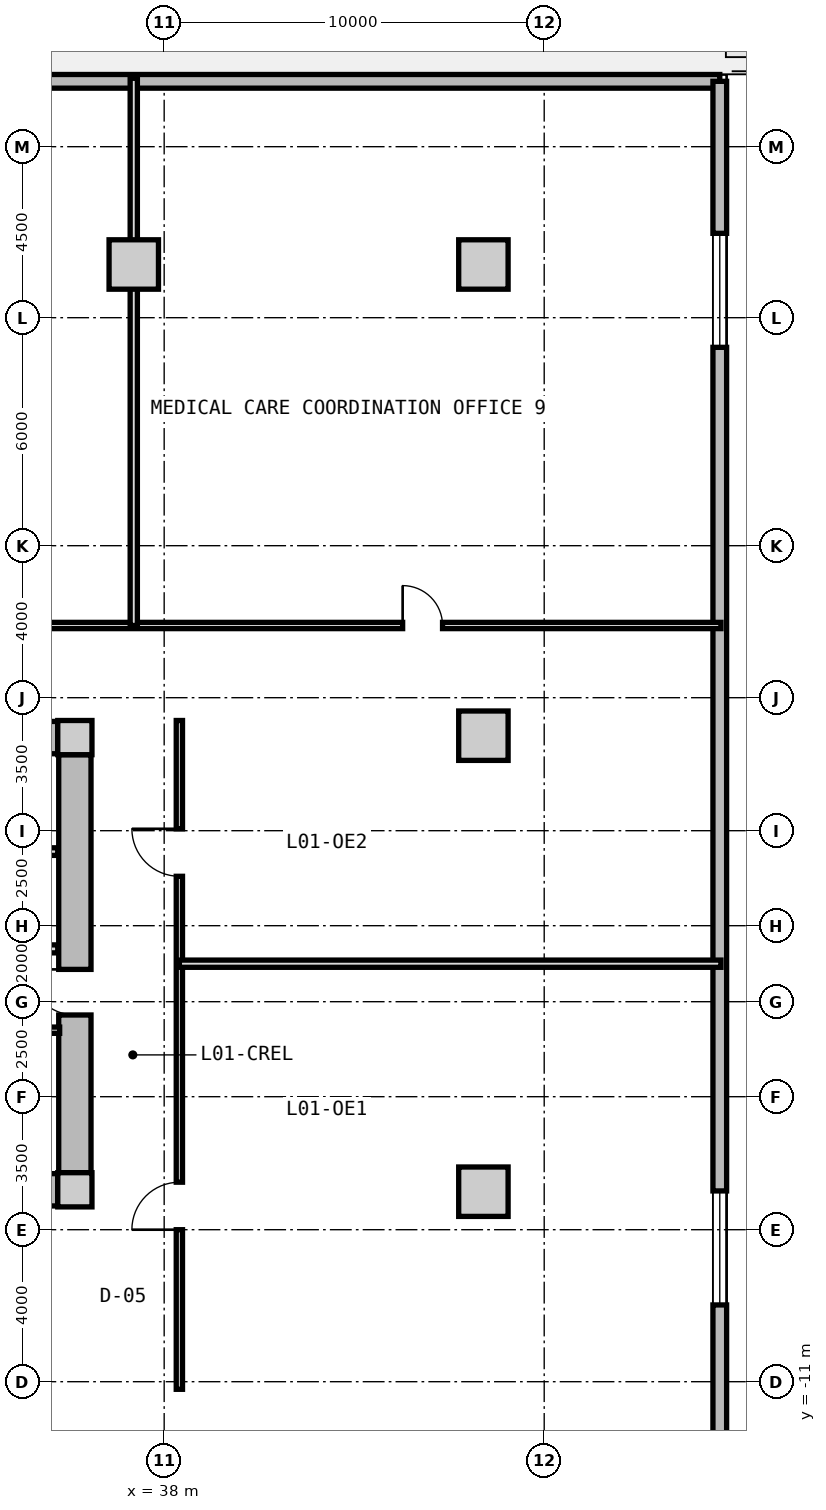
"""IFC4 building model, lengths in metres.
Left out: names, types, materials, properties, quantities, classifications, styles, units other than length and angle.
Written with IfcOpenShell. Run it as: python <this file> out.ifc"""

import sys

from ifc_helpers import new_model, si_unit, direction, frame, frame_2d, origin, origin_2d, place, context, subcontext, project, spatial, rectangle, extrude, source, transform, mapped, element, fill, save


model = new_model("IFC4")
c1 = context("Model", 3, precision=1e-05, world=origin(), true_north=direction((0.0, 1.0)))
c2 = subcontext(c1, "Body", "Model", "MODEL_VIEW")
j1 = project(units=[si_unit("LENGTHUNIT", "METRE"), si_unit("PLANEANGLEUNIT", "RADIAN")], contexts=[c1])
p1 = place(None, origin())
s1 = spatial("IfcSite", under=j1, at=p1, CompositionType="ELEMENT")
p2 = place(p1, origin())
s2 = spatial("IfcBuilding", under=s1, at=p2, CompositionType="ELEMENT")
p3 = place(p2, frame((0.0, 0.0, 4.2)))
s3 = spatial("IfcBuildingStorey", under=s2, at=p3, CompositionType="ELEMENT", Elevation=4.2)
m1 = source(origin(), c2, "Body", "SweptSolid", [
    extrude(rectangle(XDim=0.9, YDim=0.9, at=origin_2d()), origin(), (0.0, 0.0, 1.0), 4.2),
])
for number, where, z_axis, x_axis in (
    (1, (35.65, -5.95, 0.0), (0.0, 0.0, 1.0), (1.0, 0.0, 0.0)),
    (2, (35.65, 5.95, 0.0), (0.0, 0.0, 1.0), (1.0, 0.0, 0.0)),
):
    element("IfcColumn", number, at=place(p3, frame(where, z_axis=z_axis, x_axis=x_axis)), inside=s3, PredefinedType="COLUMN", context=c2, shape_type="MappedRepresentation", body=[
        mapped(m1, transform((0.0, 0.0, 0.0), x_axis=(1.0, 0.0, 0.0), y_axis=(0.0, 1.0, 0.0), z_axis=(0.0, 0.0, 1.0), scale=1.0)),
    ])
m2 = source(origin(), c2, "Body", "SweptSolid", [
    extrude(rectangle(XDim=14.4, YDim=0.85, at=frame_2d((7.2, 0.0))), origin(), (0.0, 0.0, 1.0), 3.88),
])
for number, where, z_axis, x_axis in (
    (3, (20.8, 5.95, 0.0), (0.0, 0.0, 1.0), (1.0, 0.0, 0.0)),
    (4, (35.2, -5.95, 0.0), (0.0, 0.0, 1.0), (-1.0, 0.0, 0.0)),
):
    element("IfcWall", number, at=place(p3, frame(where, z_axis=z_axis, x_axis=x_axis)), inside=s3, PredefinedType="SHEAR", context=c2, shape_type="MappedRepresentation", body=[
        mapped(m2, transform((0.0, 0.0, 0.0), x_axis=(1.0, 0.0, 0.0), y_axis=(0.0, 1.0, 0.0), z_axis=(0.0, 0.0, 1.0), scale=1.0)),
    ])
m3 = source(origin(), c2, "Body", "SweptSolid", [
    extrude(rectangle(XDim=11.0, YDim=0.85, at=frame_2d((5.5, 0.0))), origin(), (0.0, 0.0, 1.0), 3.88),
])
p4 = place(p3, frame((35.65, 5.5, 0.0), z_axis=(0.0, 0.0, 1.0), x_axis=(0.0, -1.0, 0.0)))
e5 = element("IfcWall", 5, at=p4, inside=s3, PredefinedType="SHEAR", context=c2, shape_type="MappedRepresentation", body=[
    mapped(m3, transform((0.0, 0.0, 0.0), x_axis=(1.0, 0.0, 0.0), y_axis=(0.0, 1.0, 0.0), z_axis=(0.0, 0.0, 1.0), scale=1.0)),
])
p5 = place(p4, frame((5.65, 0.0, 0.0)))
e6 = element("IfcOpeningElement", 6, at=p5, cuts=e5, PredefinedType="OPENING", context=c2, shape_type="SweptSolid", body=[
    extrude(rectangle(XDim=1.2, YDim=2.15, at=frame_2d((0.6, 1.075))), frame((0.0, 0.435, 0.0), z_axis=(0.0, -1.0, 0.0), x_axis=(1.0, 0.0, 0.0)), (0.0, 0.0, 1.0), 0.87),
])
m4 = source(origin(), c2, "Body", "SweptSolid", [
    extrude(rectangle(XDim=1.3, YDim=1.3, at=origin_2d()), origin(), (0.0, 0.0, 1.0), 4.2),
])
for number, where, z_axis, x_axis in (
    (7, (37.2, 18.4, 0.0), (0.0, 0.0, 1.0), (1.0, 0.0, 0.0)),
    (8, (46.4, 18.4, 0.0), (0.0, 0.0, 1.0), (1.0, 0.0, 0.0)),
    (9, (46.4, -6.0, 0.0), (0.0, 0.0, 1.0), (1.0, 0.0, 0.0)),
    (10, (46.4, 6.0, 0.0), (0.0, 0.0, 1.0), (1.0, 0.0, 0.0)),
):
    element("IfcColumn", number, at=place(p3, frame(where, z_axis=z_axis, x_axis=x_axis)), inside=s3, PredefinedType="COLUMN", context=c2, shape_type="MappedRepresentation", body=[
        mapped(m4, transform((0.0, 0.0, 0.0), x_axis=(1.0, 0.0, 0.0), y_axis=(0.0, 1.0, 0.0), z_axis=(0.0, 0.0, 1.0), scale=1.0)),
    ])
m5 = source(origin(), c2, "Body", "SweptSolid", [
    extrude(rectangle(XDim=105.24, YDim=0.36, at=frame_2d((52.62, 0.0))), origin(), (0.0, 0.0, 1.0), 3.88),
])
p6 = place(p3, frame((-52.62, 23.22, 0.0), z_axis=(0.0, 0.0, 1.0), x_axis=(1.0, 0.0, 0.0)))
e11 = element("IfcWall", 11, at=p6, inside=s3, PredefinedType="SOLIDWALL", context=c2, shape_type="MappedRepresentation", body=[
    mapped(m5, transform((0.0, 0.0, 0.0), x_axis=(1.0, 0.0, 0.0), y_axis=(0.0, 1.0, 0.0), z_axis=(0.0, 0.0, 1.0), scale=1.0)),
])
p7 = place(p6, frame((49.12, 0.0, 0.0)))
e12 = element("IfcOpeningElement", 12, at=p7, cuts=e11, PredefinedType="OPENING", context=c2, shape_type="SweptSolid", body=[
    extrude(rectangle(XDim=1.15, YDim=2.25, at=frame_2d((0.575, 1.125))), frame((0.0, 0.19, 0.0), z_axis=(0.0, -1.0, 0.0), x_axis=(1.0, 0.0, 0.0)), (0.0, 0.0, 1.0), 0.38),
])
p8 = place(p6, frame((4.0, 0.0, 0.85)))
e13 = element("IfcOpeningElement", 13, at=p8, cuts=e11, PredefinedType="OPENING", context=c2, shape_type="SweptSolid", body=[
    extrude(rectangle(XDim=3.0, YDim=2.1, at=frame_2d((1.5, 1.05))), frame((0.0, 0.19, 0.0), z_axis=(0.0, -1.0, 0.0), x_axis=(1.0, 0.0, 0.0)), (0.0, 0.0, 1.0), 0.38),
])
p9 = place(p6, frame((12.4, 0.0, 0.9)))
e14 = element("IfcOpeningElement", 14, at=p9, cuts=e11, PredefinedType="OPENING", context=c2, shape_type="SweptSolid", body=[
    extrude(rectangle(XDim=1.8, YDim=2.0, at=frame_2d((0.9, 1.0))), frame((0.0, 0.19, 0.0), z_axis=(0.0, -1.0, 0.0), x_axis=(1.0, 0.0, 0.0)), (0.0, 0.0, 1.0), 0.38),
])
p10 = place(p6, frame((20.8, 0.0, 0.85)))
e15 = element("IfcOpeningElement", 15, at=p10, cuts=e11, PredefinedType="OPENING", context=c2, shape_type="SweptSolid", body=[
    extrude(rectangle(XDim=2.4, YDim=2.2, at=frame_2d((1.2, 1.1))), frame((0.0, 0.19, 0.0), z_axis=(0.0, -1.0, 0.0), x_axis=(1.0, 0.0, 0.0)), (0.0, 0.0, 1.0), 0.38),
])
p11 = place(p6, frame((29.2, 0.0, 0.85)))
e16 = element("IfcOpeningElement", 16, at=p11, cuts=e11, PredefinedType="OPENING", context=c2, shape_type="SweptSolid", body=[
    extrude(rectangle(XDim=3.0, YDim=2.1, at=frame_2d((1.5, 1.05))), frame((0.0, 0.19, 0.0), z_axis=(0.0, -1.0, 0.0), x_axis=(1.0, 0.0, 0.0)), (0.0, 0.0, 1.0), 0.38),
])
p12 = place(p6, frame((37.6, 0.0, 0.9)))
e17 = element("IfcOpeningElement", 17, at=p12, cuts=e11, PredefinedType="OPENING", context=c2, shape_type="SweptSolid", body=[
    extrude(rectangle(XDim=1.8, YDim=2.0, at=frame_2d((0.9, 1.0))), frame((0.0, 0.19, 0.0), z_axis=(0.0, -1.0, 0.0), x_axis=(1.0, 0.0, 0.0)), (0.0, 0.0, 1.0), 0.38),
])
p13 = place(p6, frame((62.8, 0.0, 0.9)))
e18 = element("IfcOpeningElement", 18, at=p13, cuts=e11, PredefinedType="OPENING", context=c2, shape_type="SweptSolid", body=[
    extrude(rectangle(XDim=1.8, YDim=2.0, at=frame_2d((0.9, 1.0))), frame((0.0, 0.19, 0.0), z_axis=(0.0, -1.0, 0.0), x_axis=(1.0, 0.0, 0.0)), (0.0, 0.0, 1.0), 0.38),
])
p14 = place(p6, frame((71.2, 0.0, 0.85)))
e19 = element("IfcOpeningElement", 19, at=p14, cuts=e11, PredefinedType="OPENING", context=c2, shape_type="SweptSolid", body=[
    extrude(rectangle(XDim=2.4, YDim=2.2, at=frame_2d((1.2, 1.1))), frame((0.0, 0.19, 0.0), z_axis=(0.0, -1.0, 0.0), x_axis=(1.0, 0.0, 0.0)), (0.0, 0.0, 1.0), 0.38),
])
m6 = source(origin(), c2, "Body", "SweptSolid", [
    extrude(rectangle(XDim=46.44, YDim=0.36, at=frame_2d((23.22, 0.0))), origin(), (0.0, 0.0, 1.0), 3.88),
])
p15 = place(p3, frame((52.62, 23.22, 0.0), z_axis=(0.0, 0.0, 1.0), x_axis=(0.0, -1.0, 0.0)))
e20 = element("IfcWall", 20, at=p15, inside=s3, PredefinedType="SOLIDWALL", context=c2, shape_type="MappedRepresentation", body=[
    mapped(m6, transform((0.0, 0.0, 0.0), x_axis=(1.0, 0.0, 0.0), y_axis=(0.0, 1.0, 0.0), z_axis=(0.0, 0.0, 1.0), scale=1.0)),
])
p16 = place(p15, frame((4.0, 0.0, 0.85)))
e21 = element("IfcOpeningElement", 21, at=p16, cuts=e20, PredefinedType="OPENING", context=c2, shape_type="SweptSolid", body=[
    extrude(rectangle(XDim=3.0, YDim=2.1, at=frame_2d((1.5, 1.05))), frame((0.0, 0.19, 0.0), z_axis=(0.0, -1.0, 0.0), x_axis=(1.0, 0.0, 0.0)), (0.0, 0.0, 1.0), 0.38),
])
p17 = place(p15, frame((29.2, 0.0, 0.85)))
e22 = element("IfcOpeningElement", 22, at=p17, cuts=e20, PredefinedType="OPENING", context=c2, shape_type="SweptSolid", body=[
    extrude(rectangle(XDim=3.0, YDim=2.1, at=frame_2d((1.5, 1.05))), frame((0.0, 0.19, 0.0), z_axis=(0.0, -1.0, 0.0), x_axis=(1.0, 0.0, 0.0)), (0.0, 0.0, 1.0), 0.38),
])
m7 = source(origin(), c2, "Body", "SweptSolid", [
    extrude(rectangle(XDim=3.2, YDim=0.2, at=frame_2d((1.6, 0.0))), origin(), (0.0, 0.0, 1.0), 3.865),
])
p18 = place(p3, frame((32.0, 2.95, 0.0), z_axis=(0.0, 0.0, 1.0), x_axis=(1.0, 0.0, 0.0)))
e23 = element("IfcWall", 23, at=p18, inside=s3, PredefinedType="PARTITIONING", context=c2, shape_type="MappedRepresentation", body=[
    mapped(m7, transform((0.0, 0.0, 0.0), x_axis=(1.0, 0.0, 0.0), y_axis=(0.0, 1.0, 0.0), z_axis=(0.0, 0.0, 1.0), scale=1.0)),
])
m8 = source(origin(), c2, "Body", "SweptSolid", [
    extrude(rectangle(XDim=6.66, YDim=0.21, at=frame_2d((3.33, 0.0))), origin(), (0.0, 0.0, 1.0), 3.865),
])
p19 = place(p3, frame((28.54, 0.39, 0.0), z_axis=(0.0, 0.0, 1.0), x_axis=(1.0, 0.0, 0.0)))
e24 = element("IfcWall", 24, at=p19, inside=s3, PredefinedType="PARTITIONING", context=c2, shape_type="MappedRepresentation", body=[
    mapped(m8, transform((0.0, 0.0, 0.0), x_axis=(1.0, 0.0, 0.0), y_axis=(0.0, 1.0, 0.0), z_axis=(0.0, 0.0, 1.0), scale=1.0)),
])
p20 = place(p19, frame((1.0, 0.0, 0.0)))
e25 = element("IfcOpeningElement", 25, at=p20, cuts=e24, PredefinedType="OPENING", context=c2, shape_type="SweptSolid", body=[
    extrude(rectangle(XDim=1.2, YDim=2.15, at=frame_2d((0.6, 1.075))), frame((0.0, 0.115, 0.0), z_axis=(0.0, -1.0, 0.0), x_axis=(1.0, 0.0, 0.0)), (0.0, 0.0, 1.0), 0.23),
])
m9 = source(origin(), c2, "Body", "SweptSolid", [
    extrude(rectangle(XDim=2.7, YDim=0.165, at=frame_2d((1.35, 0.0))), origin(), (0.0, 0.0, 1.0), 3.865),
])
p21 = place(p3, frame((32.55, -1.75, 0.0), z_axis=(0.0, 0.0, 1.0), x_axis=(1.0, 0.0, 0.0)))
e26 = element("IfcWall", 26, at=p21, inside=s3, PredefinedType="PARTITIONING", context=c2, shape_type="MappedRepresentation", body=[
    mapped(m9, transform((0.0, 0.0, 0.0), x_axis=(1.0, 0.0, 0.0), y_axis=(0.0, 1.0, 0.0), z_axis=(0.0, 0.0, 1.0), scale=1.0)),
])
p22 = place(p21, frame((0.85, 0.0, 0.0)))
e27 = element("IfcOpeningElement", 27, at=p22, cuts=e26, PredefinedType="OPENING", context=c2, shape_type="SweptSolid", body=[
    extrude(rectangle(XDim=0.925, YDim=2.1, at=frame_2d((0.462, 1.05))), frame((0.0, 0.093, 0.0), z_axis=(0.0, -1.0, 0.0), x_axis=(1.0, 0.0, 0.0)), (0.0, 0.0, 1.0), 0.185),
])
m10 = source(origin(), c2, "Body", "SweptSolid", [
    extrude(rectangle(XDim=17.6, YDim=0.165, at=frame_2d((8.8, 0.0))), origin(), (0.0, 0.0, 1.0), 3.865),
])
p23 = place(p3, frame((38.4, -11.2, 0.0), z_axis=(0.0, 0.0, 1.0), x_axis=(0.0, 1.0, 0.0)))
e28 = element("IfcWall", 28, at=p23, inside=s3, PredefinedType="PARTITIONING", context=c2, shape_type="MappedRepresentation", body=[
    mapped(m10, transform((0.0, 0.0, 0.0), x_axis=(1.0, 0.0, 0.0), y_axis=(0.0, 1.0, 0.0), z_axis=(0.0, 0.0, 1.0), scale=1.0)),
])
p24 = place(p23, frame((4.2, 0.0, 0.0)))
e29 = element("IfcOpeningElement", 29, at=p24, cuts=e28, PredefinedType="OPENING", context=c2, shape_type="SweptSolid", body=[
    extrude(rectangle(XDim=1.25, YDim=2.2, at=frame_2d((0.625, 1.1))), frame((0.0, 0.093, 0.0), z_axis=(0.0, -1.0, 0.0), x_axis=(1.0, 0.0, 0.0)), (0.0, 0.0, 1.0), 0.185),
])
p25 = place(p23, frame((13.5, 0.0, 0.0)))
e30 = element("IfcOpeningElement", 30, at=p25, cuts=e28, PredefinedType="OPENING", context=c2, shape_type="SweptSolid", body=[
    extrude(rectangle(XDim=1.25, YDim=2.2, at=frame_2d((0.625, 1.1))), frame((0.0, 0.093, 0.0), z_axis=(0.0, -1.0, 0.0), x_axis=(1.0, 0.0, 0.0)), (0.0, 0.0, 1.0), 0.185),
])
m11 = source(origin(), c2, "Body", "SweptSolid", [
    extrude(rectangle(XDim=14.25, YDim=0.19, at=frame_2d((7.125, 0.0))), origin(), (0.0, 0.0, 1.0), 3.865),
])
p26 = place(p3, frame((38.4, 0.0, 0.0), z_axis=(0.0, 0.0, 1.0), x_axis=(1.0, 0.0, 0.0)))
e31 = element("IfcWall", 31, at=p26, inside=s3, PredefinedType="PARTITIONING", context=c2, shape_type="MappedRepresentation", body=[
    mapped(m11, transform((0.0, 0.0, 0.0), x_axis=(1.0, 0.0, 0.0), y_axis=(0.0, 1.0, 0.0), z_axis=(0.0, 0.0, 1.0), scale=1.0)),
])
m12 = source(origin(), c2, "Body", "SweptSolid", [
    extrude(rectangle(XDim=105.3, YDim=0.165, at=frame_2d((52.65, 0.0))), origin(), (0.0, 0.0, 1.0), 3.865),
])
p27 = place(p3, frame((-52.65, 8.9, 0.0), z_axis=(0.0, 0.0, 1.0), x_axis=(1.0, 0.0, 0.0)))
e32 = element("IfcWall", 32, at=p27, inside=s3, PredefinedType="PARTITIONING", context=c2, shape_type="MappedRepresentation", body=[
    mapped(m12, transform((0.0, 0.0, 0.0), x_axis=(1.0, 0.0, 0.0), y_axis=(0.0, 1.0, 0.0), z_axis=(0.0, 0.0, 1.0), scale=1.0)),
])
p28 = place(p27, frame((7.325, 0.0, 0.0)))
e33 = element("IfcOpeningElement", 33, at=p28, cuts=e32, PredefinedType="OPENING", context=c2, shape_type="SweptSolid", body=[
    extrude(rectangle(XDim=1.05, YDim=2.15, at=frame_2d((0.525, 1.075))), frame((0.0, 0.093, 0.0), z_axis=(0.0, -1.0, 0.0), x_axis=(1.0, 0.0, 0.0)), (0.0, 0.0, 1.0), 0.185),
])
p29 = place(p27, frame((19.525, 0.0, 0.0)))
e34 = element("IfcOpeningElement", 34, at=p29, cuts=e32, PredefinedType="OPENING", context=c2, shape_type="SweptSolid", body=[
    extrude(rectangle(XDim=1.05, YDim=2.15, at=frame_2d((0.525, 1.075))), frame((0.0, 0.093, 0.0), z_axis=(0.0, -1.0, 0.0), x_axis=(1.0, 0.0, 0.0)), (0.0, 0.0, 1.0), 0.185),
])
p30 = place(p27, frame((29.725, 0.0, 0.0)))
e35 = element("IfcOpeningElement", 35, at=p30, cuts=e32, PredefinedType="OPENING", context=c2, shape_type="SweptSolid", body=[
    extrude(rectangle(XDim=1.05, YDim=2.15, at=frame_2d((0.525, 1.075))), frame((0.0, 0.093, 0.0), z_axis=(0.0, -1.0, 0.0), x_axis=(1.0, 0.0, 0.0)), (0.0, 0.0, 1.0), 0.185),
])
p31 = place(p27, frame((40.475, 0.0, 0.0)))
e36 = element("IfcOpeningElement", 36, at=p31, cuts=e32, PredefinedType="OPENING", context=c2, shape_type="SweptSolid", body=[
    extrude(rectangle(XDim=1.05, YDim=2.15, at=frame_2d((0.525, 1.075))), frame((0.0, 0.093, 0.0), z_axis=(0.0, -1.0, 0.0), x_axis=(1.0, 0.0, 0.0)), (0.0, 0.0, 1.0), 0.185),
])
p32 = place(p27, frame((52.125, 0.0, 0.0)))
e37 = element("IfcOpeningElement", 37, at=p32, cuts=e32, PredefinedType="OPENING", context=c2, shape_type="SweptSolid", body=[
    extrude(rectangle(XDim=1.05, YDim=2.15, at=frame_2d((0.525, 1.075))), frame((0.0, 0.093, 0.0), z_axis=(0.0, -1.0, 0.0), x_axis=(1.0, 0.0, 0.0)), (0.0, 0.0, 1.0), 0.185),
])
p33 = place(p27, frame((63.775, 0.0, 0.0)))
e38 = element("IfcOpeningElement", 38, at=p33, cuts=e32, PredefinedType="OPENING", context=c2, shape_type="SweptSolid", body=[
    extrude(rectangle(XDim=1.05, YDim=2.15, at=frame_2d((0.525, 1.075))), frame((0.0, 0.093, 0.0), z_axis=(0.0, -1.0, 0.0), x_axis=(1.0, 0.0, 0.0)), (0.0, 0.0, 1.0), 0.185),
])
p34 = place(p27, frame((74.525, 0.0, 0.0)))
e39 = element("IfcOpeningElement", 39, at=p34, cuts=e32, PredefinedType="OPENING", context=c2, shape_type="SweptSolid", body=[
    extrude(rectangle(XDim=1.05, YDim=2.15, at=frame_2d((0.525, 1.075))), frame((0.0, 0.093, 0.0), z_axis=(0.0, -1.0, 0.0), x_axis=(1.0, 0.0, 0.0)), (0.0, 0.0, 1.0), 0.185),
])
p35 = place(p27, frame((84.725, 0.0, 0.0)))
e40 = element("IfcOpeningElement", 40, at=p35, cuts=e32, PredefinedType="OPENING", context=c2, shape_type="SweptSolid", body=[
    extrude(rectangle(XDim=1.05, YDim=2.15, at=frame_2d((0.525, 1.075))), frame((0.0, 0.093, 0.0), z_axis=(0.0, -1.0, 0.0), x_axis=(1.0, 0.0, 0.0)), (0.0, 0.0, 1.0), 0.185),
])
p36 = place(p27, frame((96.925, 0.0, 0.0)))
e41 = element("IfcOpeningElement", 41, at=p36, cuts=e32, PredefinedType="OPENING", context=c2, shape_type="SweptSolid", body=[
    extrude(rectangle(XDim=1.05, YDim=2.15, at=frame_2d((0.525, 1.075))), frame((0.0, 0.093, 0.0), z_axis=(0.0, -1.0, 0.0), x_axis=(1.0, 0.0, 0.0)), (0.0, 0.0, 1.0), 0.185),
])
m13 = source(origin(), c2, "Body", "SweptSolid", [
    extrude(rectangle(XDim=14.4, YDim=0.19, at=frame_2d((7.2, 0.0))), origin(), (0.0, 0.0, 1.0), 3.865),
])
p37 = place(p3, frame((37.2, 8.9, 0.0), z_axis=(0.0, 0.0, 1.0), x_axis=(0.0, 1.0, 0.0)))
e42 = element("IfcWall", 42, at=p37, inside=s3, PredefinedType="PARTITIONING", context=c2, shape_type="MappedRepresentation", body=[
    mapped(m13, transform((0.0, 0.0, 0.0), x_axis=(1.0, 0.0, 0.0), y_axis=(0.0, 1.0, 0.0), z_axis=(0.0, 0.0, 1.0), scale=1.0)),
])
m14 = source(origin(), c2, "Body", "SweptSolid", [
    extrude(rectangle(XDim=3.0, YDim=2.1, at=frame_2d((1.5, 1.05))), frame((0.0, 0.03, 0.0), z_axis=(0.0, -1.0, 0.0), x_axis=(1.0, 0.0, 0.0)), (0.0, 0.0, 1.0), 0.06),
])
p38 = place(p16, origin())
e43 = element("IfcWindow", 43, at=p38, inside=s3, PartitioningType="SINGLE_PANEL", PredefinedType="WINDOW", context=c2, shape_type="MappedRepresentation", body=[
    mapped(m14, transform((0.0, 0.0, 0.0), x_axis=(1.0, 0.0, 0.0), y_axis=(0.0, 1.0, 0.0), z_axis=(0.0, 0.0, 1.0), scale=1.0)),
])
fill(e21, e43)
p39 = place(p17, origin())
e44 = element("IfcWindow", 44, at=p39, inside=s3, PartitioningType="SINGLE_PANEL", PredefinedType="WINDOW", context=c2, shape_type="MappedRepresentation", body=[
    mapped(m14, transform((0.0, 0.0, 0.0), x_axis=(1.0, 0.0, 0.0), y_axis=(0.0, 1.0, 0.0), z_axis=(0.0, 0.0, 1.0), scale=1.0)),
])
fill(e22, e44)
m15 = source(origin(), c2, "Body", "SweptSolid", [
    extrude(rectangle(XDim=1.2, YDim=2.15, at=frame_2d((0.6, 1.075))), frame((0.0, 0.025, 0.0), z_axis=(0.0, -1.0, 0.0), x_axis=(1.0, 0.0, 0.0)), (0.0, 0.0, 1.0), 0.05),
])
p40 = place(p5, frame((1.2, 0.0, 0.0), z_axis=(0.0, 0.0, 1.0), x_axis=(-1.0, 0.0, 0.0)))
e45 = element("IfcDoor", 45, at=p40, inside=s3, OperationType="SINGLE_SWING_RIGHT", PredefinedType="DOOR", context=c2, shape_type="MappedRepresentation", body=[
    mapped(m15, transform((0.0, 0.0, 0.0), x_axis=(1.0, 0.0, 0.0), y_axis=(0.0, 1.0, 0.0), z_axis=(0.0, 0.0, 1.0), scale=1.0)),
])
fill(e6, e45)
m16 = source(origin(), c2, "Body", "SweptSolid", [
    extrude(rectangle(XDim=1.25, YDim=2.2, at=frame_2d((0.625, 1.1))), frame((0.0, 0.025, 0.0), z_axis=(0.0, -1.0, 0.0), x_axis=(1.0, 0.0, 0.0)), (0.0, 0.0, 1.0), 0.05),
])
p41 = place(p24, origin())
e46 = element("IfcDoor", 46, at=p41, inside=s3, OperationType="SINGLE_SWING_LEFT", PredefinedType="DOOR", context=c2, shape_type="MappedRepresentation", body=[
    mapped(m16, transform((0.0, 0.0, 0.0), x_axis=(1.0, 0.0, 0.0), y_axis=(0.0, 1.0, 0.0), z_axis=(0.0, 0.0, 1.0), scale=1.0)),
])
fill(e29, e46)
p42 = place(p25, origin())
e47 = element("IfcDoor", 47, at=p42, inside=s3, OperationType="SINGLE_SWING_RIGHT", PredefinedType="DOOR", context=c2, shape_type="MappedRepresentation", body=[
    mapped(m16, transform((0.0, 0.0, 0.0), x_axis=(1.0, 0.0, 0.0), y_axis=(0.0, 1.0, 0.0), z_axis=(0.0, 0.0, 1.0), scale=1.0)),
])
fill(e30, e47)
m17 = source(origin(), c2, "Body", "SweptSolid", [
    extrude(rectangle(XDim=1.05, YDim=2.15, at=frame_2d((0.525, 1.075))), frame((0.0, 0.025, 0.0), z_axis=(0.0, -1.0, 0.0), x_axis=(1.0, 0.0, 0.0)), (0.0, 0.0, 1.0), 0.05),
])
p43 = place(p36, origin())
e48 = element("IfcDoor", 48, at=p43, inside=s3, OperationType="SINGLE_SWING_LEFT", PredefinedType="DOOR", context=c2, shape_type="MappedRepresentation", body=[
    mapped(m17, transform((0.0, 0.0, 0.0), x_axis=(1.0, 0.0, 0.0), y_axis=(0.0, 1.0, 0.0), z_axis=(0.0, 0.0, 1.0), scale=1.0)),
])
fill(e41, e48)
save(model, sys.argv[1])
